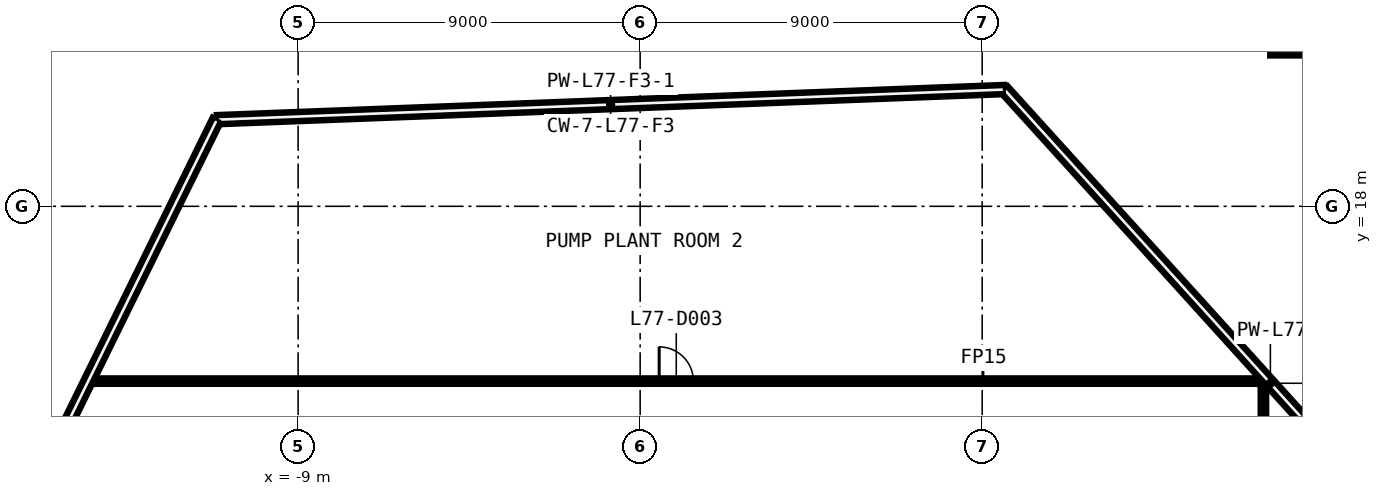
"""IFC4 building model, lengths in metres.
Left out: names, types, materials, properties, quantities, classifications, styles, units other than length and angle.
Written with IfcOpenShell. Run it as: python <this file> out.ifc"""

import sys

from ifc_helpers import new_model, si_unit, direction, frame, frame_2d, origin, origin_2d, place, context, subcontext, project, spatial, rectangle, hollow_rectangle, extrude, element, fill, save


model = new_model("IFC4")
c1 = context("Model", 3, precision=1e-05, world=origin(), true_north=direction((0.0, 1.0)))
c2 = subcontext(c1, "Body", "Model", "MODEL_VIEW")
j1 = project(units=[si_unit("LENGTHUNIT", "METRE"), si_unit("PLANEANGLEUNIT", "RADIAN")], contexts=[c1])
p1 = place(None, origin())
s1 = spatial("IfcSite", under=j1, at=p1, CompositionType="ELEMENT")
p2 = place(p1, origin())
s2 = spatial("IfcBuilding", under=s1, at=p2, CompositionType="ELEMENT")
p3 = place(p2, frame((0.0, 0.0, 359.0)))
s3 = spatial("IfcBuildingStorey", under=s2, at=p3, CompositionType="ELEMENT", Elevation=359.0)
p4 = place(p3, frame((17.276, 22.666, 0.0), z_axis=(0.0, 0.0, 1.0), x_axis=(1.0, 0.0, 0.0)))
e1 = element("IfcColumn", 1, at=p4, inside=s3, PredefinedType="COLUMN", context=c2, shape_type="SweptSolid", body=[
    extrude(hollow_rectangle(XDim=1.4, YDim=1.4, WallThickness=0.06, at=origin_2d()), origin(), (0.0, 0.0, 1.0), 4.2),
])
p5 = place(p3, frame((-14.5, 13.4, 0.0), z_axis=(0.0, 0.0, 1.0), x_axis=(1.0, 0.0, 0.0)))
e2 = element("IfcWall", 2, at=p5, inside=s3, PredefinedType="PARTITIONING", context=c2, shape_type="SweptSolid", body=[
    extrude(rectangle(XDim=30.975, YDim=0.15, at=frame_2d((15.487, 0.0))), origin(), (0.0, 0.0, 1.0), 3.8),
])
p6 = place(p5, frame((15.0, 0.0, 0.0)))
e3 = element("IfcOpeningElement", 3, at=p6, cuts=e2, PredefinedType="OPENING", context=c2, shape_type="SweptSolid", body=[
    extrude(rectangle(XDim=0.9, YDim=2.1, at=frame_2d((0.45, 1.05))), frame((0.0, 0.085, 0.0), z_axis=(0.0, -1.0, 0.0), x_axis=(1.0, 0.0, 0.0)), (0.0, 0.0, 1.0), 0.17),
])
p7 = place(p3, frame((16.4, -9.676, 0.0), z_axis=(0.0, 0.0, 1.0), x_axis=(0.0, 1.0, 0.0)))
e4 = element("IfcWall", 4, at=p7, inside=s3, PredefinedType="PARTITIONING", context=c2, shape_type="SweptSolid", body=[
    extrude(rectangle(XDim=23.001, YDim=0.15, at=frame_2d((11.5, 0.0))), origin(), (0.0, 0.0, 1.0), 3.8),
])
p8 = place(p3, frame((23.583, 5.614, 0.0), z_axis=(0.0, 0.0, 1.0), x_axis=(-0.671256862452, 0.741224813812, 0.0)))
e5 = element("IfcWall", 5, at=p8, inside=s3, PredefinedType="SOLIDWALL", context=c2, shape_type="SweptSolid", body=[
    extrude(rectangle(XDim=20.856, YDim=0.25, at=frame_2d((10.428, 0.0))), origin(), (0.0, 0.0, 1.0), 3.8),
])
p9 = place(p3, frame((9.583, 21.073, 0.0), z_axis=(0.0, 0.0, 1.0), x_axis=(-0.999269048775, -0.038227845343, 0.0)))
e6 = element("IfcWall", 6, at=p9, inside=s3, PredefinedType="SOLIDWALL", context=c2, shape_type="SweptSolid", body=[
    extrude(rectangle(XDim=20.737, YDim=0.25, at=frame_2d((10.368, 0.0))), origin(), (0.0, 0.0, 1.0), 3.8),
])
p10 = place(p3, frame((-11.138, 20.28, 0.0), z_axis=(0.0, 0.0, 1.0), x_axis=(-0.441342255748, -0.897338850876, 0.0)))
e7 = element("IfcWall", 7, at=p10, inside=s3, PredefinedType="SOLIDWALL", context=c2, shape_type="SweptSolid", body=[
    extrude(rectangle(XDim=28.805, YDim=0.25, at=frame_2d((14.403, 0.0))), origin(), (0.0, 0.0, 1.0), 3.8),
])
p11 = place(p6, origin())
e8 = element("IfcDoor", 8, at=p11, inside=s3, OperationType="SINGLE_SWING_RIGHT", PredefinedType="DOOR", context=c2, shape_type="SweptSolid", body=[
    extrude(rectangle(XDim=0.9, YDim=2.1, at=frame_2d((0.45, 1.05))), frame((0.0, 0.025, 0.0), z_axis=(0.0, -1.0, 0.0), x_axis=(1.0, 0.0, 0.0)), (0.0, 0.0, 1.0), 0.05),
])
fill(e3, e8)
save(model, sys.argv[1])
